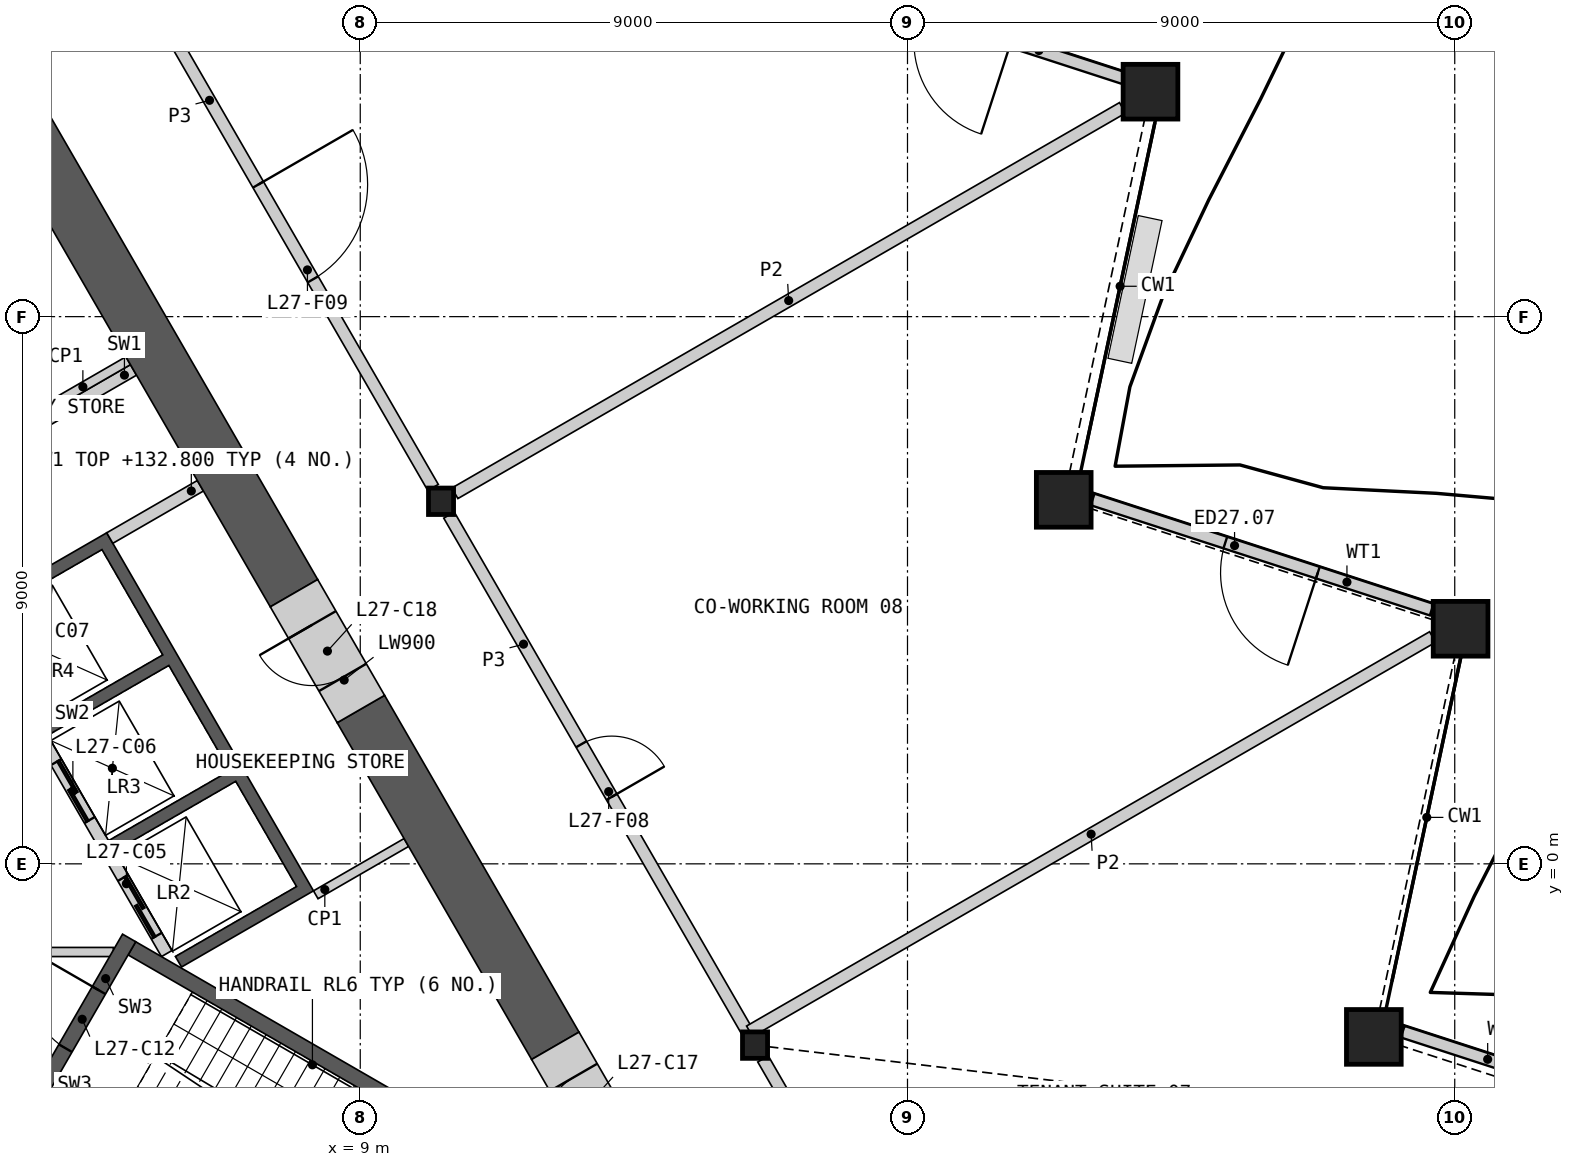
"""IFC4 building model, lengths in metres.
Left out: names, types, materials, properties, quantities, classifications, styles, units other than length and angle.
Written with IfcOpenShell. Run it as: python <this file> out.ifc"""

import sys

from ifc_helpers import new_model, si_unit, direction, frame, frame_2d, origin, origin_2d, place, context, subcontext, project, spatial, polyline, rectangle, hollow_rectangle, i_section, outline, extrude, element, fill, save


model = new_model("IFC4")
c1 = context("Model", 3, precision=1e-05, world=origin(), true_north=direction((0.0, 1.0)))
c2 = subcontext(c1, "Body", "Model", "MODEL_VIEW")
j1 = project(units=[si_unit("LENGTHUNIT", "METRE"), si_unit("PLANEANGLEUNIT", "RADIAN")], contexts=[c1])
p1 = place(None, origin())
s1 = spatial("IfcSite", under=j1, at=p1, CompositionType="ELEMENT")
p2 = place(p1, origin())
s2 = spatial("IfcBuilding", under=s1, at=p2, CompositionType="ELEMENT")
p3 = place(p2, frame((0.0, 0.0, 129.0)))
s3 = spatial("IfcBuildingStorey", under=s2, at=p3, CompositionType="ELEMENT", Elevation=129.0)
for number, where, z_axis, x_axis in (
    (1, (25.669, -2.846, 0.0), (0.0, 0.0, 1.0), (1.0, 0.0, 0.0)),
    (2, (27.096, 3.866, 0.0), (0.0, 0.0, 1.0), (1.0, 0.0, 0.0)),
    (3, (20.57, 5.987, 0.0), (0.0, 0.0, 1.0), (1.0, 0.0, 0.0)),
    (4, (21.996, 12.699, 0.0), (0.0, 0.0, 1.0), (1.0, 0.0, 0.0)),
):
    element("IfcColumn", number, at=place(p3, frame(where, z_axis=z_axis, x_axis=x_axis)), inside=s3, PredefinedType="COLUMN", context=c2, shape_type="SweptSolid", body=[
        extrude(hollow_rectangle(XDim=0.9, YDim=0.9, WallThickness=0.06, at=origin_2d()), origin(), (0.0, 0.0, 1.0), 4.2),
    ])
for number, where, z_axis, x_axis in (
    (5, (15.493, -2.982, 0.0), (0.0, 0.0, 1.0), (1.0, 0.0, 0.0)),
    (6, (10.328, 5.963, 0.0), (0.0, 0.0, 1.0), (1.0, 0.0, 0.0)),
):
    element("IfcColumn", number, at=place(p3, frame(where, z_axis=z_axis, x_axis=x_axis)), inside=s3, PredefinedType="COLUMN", context=c2, shape_type="SweptSolid", body=[
        extrude(i_section(OverallWidth=0.412, OverallDepth=0.435, WebThickness=0.036, FlangeThickness=0.057, at=origin_2d()), origin(), (0.0, 0.0, 1.0), 4.2),
    ])
p4 = place(p3, frame((31.734, -4.577, 0.0), z_axis=(0.0, 0.0, 1.0), x_axis=(-0.951060927669, 0.309003417231, 0.0)))
e7 = element("IfcWall", 7, at=p4, inside=s3, PredefinedType="SOLIDWALL", context=c2, shape_type="SweptSolid", body=[
    extrude(rectangle(XDim=5.877, YDim=0.2, at=frame_2d((2.939, 0.0))), origin(), (0.0, 0.0, 1.0), 3.189),
])
p5 = place(p4, frame((2.042, 0.0, 0.0)))
e8 = element("IfcOpeningElement", 8, at=p5, cuts=e7, PredefinedType="OPENING", context=c2, shape_type="SweptSolid", body=[
    extrude(rectangle(XDim=1.6, YDim=2.4, at=frame_2d((0.8, 1.2))), frame((0.0, 0.11, 0.0), z_axis=(0.0, -1.0, 0.0), x_axis=(1.0, 0.0, 0.0)), (0.0, 0.0, 1.0), 0.22),
])
p6 = place(p3, frame((26.622, 4.181, 0.0), z_axis=(0.0, 0.0, 1.0), x_axis=(-0.951053952554, 0.309024884649, 0.0)))
e9 = element("IfcWall", 9, at=p6, inside=s3, PredefinedType="SOLIDWALL", context=c2, shape_type="SweptSolid", body=[
    extrude(rectangle(XDim=5.865, YDim=0.2, at=frame_2d((2.932, 0.0))), origin(), (0.0, 0.0, 1.0), 3.189),
])
p7 = place(p6, frame((1.969, 0.0, 0.0)))
e10 = element("IfcOpeningElement", 10, at=p7, cuts=e9, PredefinedType="OPENING", context=c2, shape_type="SweptSolid", body=[
    extrude(rectangle(XDim=1.6, YDim=2.4, at=frame_2d((0.8, 1.2))), frame((0.0, 0.11, 0.0), z_axis=(0.0, -1.0, 0.0), x_axis=(1.0, 0.0, 0.0)), (0.0, 0.0, 1.0), 0.22),
])
p8 = place(p3, frame((21.567, 12.92, 0.0), z_axis=(0.0, 0.0, 1.0), x_axis=(-0.951051366173, 0.309032844373, 0.0)))
e11 = element("IfcWall", 11, at=p8, inside=s3, PredefinedType="SOLIDWALL", context=c2, shape_type="SweptSolid", body=[
    extrude(rectangle(XDim=5.912, YDim=0.2, at=frame_2d((2.956, 0.0))), origin(), (0.0, 0.0, 1.0), 3.189),
])
p9 = place(p8, frame((1.957, 0.0, 0.0)))
e12 = element("IfcOpeningElement", 12, at=p9, cuts=e11, PredefinedType="OPENING", context=c2, shape_type="SweptSolid", body=[
    extrude(rectangle(XDim=1.6, YDim=2.4, at=frame_2d((0.8, 1.2))), frame((0.0, 0.11, 0.0), z_axis=(0.0, -1.0, 0.0), x_axis=(1.0, 0.0, 0.0)), (0.0, 0.0, 1.0), 0.22),
])
p10 = place(p3, origin())
e13 = element("IfcWall", 13, at=p10, inside=s3, PredefinedType="SHEAR", context=c2, shape_type="SweptSolid", body=[
    extrude(outline(polyline([(2.66, 4.192), (4.831, 5.445), (8.231, -0.444), (6.061, -1.697), (5.96, -1.524), (7.952, -0.374), (6.952, 1.358), (4.96, 0.208), (4.861, 0.381), (6.852, 1.531), (5.852, 3.263), (3.861, 2.113), (3.76, 2.287), (5.752, 3.437), (4.752, 5.169), (2.76, 4.019), (2.66, 4.192)])), origin(), (0.0, 0.0, 1.0), 3.8),
])
p11 = place(p3, frame((5.817, -1.476, 0.0), z_axis=(0.0, 0.0, 1.0), x_axis=(-0.500002616675, 0.866023893041, 0.0)))
e14 = element("IfcWall", 14, at=p11, inside=s3, PredefinedType="SOLIDWALL", context=c2, shape_type="SweptSolid", body=[
    extrude(rectangle(XDim=8.373, YDim=0.2, at=frame_2d((4.187, 0.0))), origin(), (0.0, 0.0, 1.0), 3.8),
])
p12 = place(p11, frame((0.337, 0.0, 0.0)))
e15 = element("IfcOpeningElement", 15, at=p12, cuts=e14, PredefinedType="OPENING", context=c2, shape_type="SweptSolid", body=[
    extrude(rectangle(XDim=1.1, YDim=2.1, at=frame_2d((0.55, 1.05))), frame((0.0, 0.11, 0.0), z_axis=(0.0, -1.0, 0.0), x_axis=(1.0, 0.0, 0.0)), (0.0, 0.0, 1.0), 0.22),
])
p13 = place(p11, frame((2.537, 0.0, 0.0)))
e16 = element("IfcOpeningElement", 16, at=p13, cuts=e14, PredefinedType="OPENING", context=c2, shape_type="SweptSolid", body=[
    extrude(rectangle(XDim=1.1, YDim=2.1, at=frame_2d((0.55, 1.05))), frame((0.0, 0.11, 0.0), z_axis=(0.0, -1.0, 0.0), x_axis=(1.0, 0.0, 0.0)), (0.0, 0.0, 1.0), 0.22),
])
p14 = place(p11, frame((4.737, 0.0, 0.0)))
e17 = element("IfcOpeningElement", 17, at=p14, cuts=e14, PredefinedType="OPENING", context=c2, shape_type="SweptSolid", body=[
    extrude(rectangle(XDim=1.1, YDim=2.1, at=frame_2d((0.55, 1.05))), frame((0.0, 0.11, 0.0), z_axis=(0.0, -1.0, 0.0), x_axis=(1.0, 0.0, 0.0)), (0.0, 0.0, 1.0), 0.22),
])
p15 = place(p11, frame((7.037, 0.0, 0.0)))
e18 = element("IfcOpeningElement", 18, at=p15, cuts=e14, PredefinedType="OPENING", context=c2, shape_type="SweptSolid", body=[
    extrude(rectangle(XDim=0.9, YDim=2.1, at=frame_2d((0.45, 1.05))), frame((0.0, 0.11, 0.0), z_axis=(0.0, -1.0, 0.0), x_axis=(1.0, 0.0, 0.0)), (0.0, 0.0, 1.0), 0.22),
])
for number, where, z_axis, x_axis in (
    (19, (4.881, 5.358, 0.0), (0.0, 0.0, 1.0), (0.866, 0.5, 0.0)),
    (20, (3.781, 7.263, 0.0), (0.0, 0.0, 1.0), (0.866, 0.5, 0.0)),
):
    element("IfcWall", number, at=place(p3, frame(where, z_axis=z_axis, x_axis=x_axis)), inside=s3, PredefinedType="SHEAR", context=c2, shape_type="SweptSolid", body=[
        extrude(rectangle(XDim=1.72, YDim=0.2, at=frame_2d((0.86, 0.0))), origin(), (0.0, 0.0, 1.0), 3.8),
    ])
p16 = place(p3, frame((-4.941, -1.45, 0.0), z_axis=(0.0, 0.0, 1.0), x_axis=(1.0, 0.0, 0.0)))
e21 = element("IfcWall", 21, at=p16, inside=s3, PredefinedType="PARTITIONING", context=c2, shape_type="SweptSolid", body=[
    extrude(rectangle(XDim=9.882, YDim=0.15, at=frame_2d((4.941, 0.0))), origin(), (0.0, 0.0, 1.0), 3.8),
])
p17 = place(p16, frame((4.391, 0.0, 0.0)))
e22 = element("IfcOpeningElement", 22, at=p17, cuts=e21, PredefinedType="OPENING", context=c2, shape_type="SweptSolid", body=[
    extrude(rectangle(XDim=1.1, YDim=2.1, at=frame_2d((0.55, 1.05))), frame((0.0, 0.085, 0.0), z_axis=(0.0, -1.0, 0.0), x_axis=(1.0, 0.0, 0.0)), (0.0, 0.0, 1.0), 0.17),
])
p18 = place(p3, origin())
e23 = element("IfcWall", 23, at=p18, inside=s3, PredefinedType="SHEAR", context=c2, shape_type="SweptSolid", body=[
    extrude(outline(polyline([(10.032, -4.298), (10.374, -4.206), (5.307, -1.281), (5.182, -1.498), (10.032, -4.298)])), origin(), (0.0, 0.0, 1.0), 3.8),
])
p19 = place(p3, frame((3.655, -3.893, 0.0), z_axis=(0.0, 0.0, 1.0), x_axis=(0.499982516597, 0.866035497597, 0.0)))
e24 = element("IfcWall", 24, at=p19, inside=s3, PredefinedType="SHEAR", context=c2, shape_type="SweptSolid", body=[
    extrude(rectangle(XDim=3.088, YDim=0.25, at=frame_2d((1.544, 0.0))), origin(), (0.0, 0.0, 1.0), 3.8),
])
p20 = place(p19, frame((0.994, 0.0, 0.0)))
e25 = element("IfcOpeningElement", 25, at=p20, cuts=e24, PredefinedType="OPENING", context=c2, shape_type="SweptSolid", body=[
    extrude(rectangle(XDim=1.1, YDim=2.1, at=frame_2d((0.55, 1.05))), frame((0.0, 0.135, 0.0), z_axis=(0.0, -1.0, 0.0), x_axis=(1.0, 0.0, 0.0)), (0.0, 0.0, 1.0), 0.27),
])
for number, where, z_axis, x_axis in (
    (26, (3.693, 7.415, 0.0), (0.0, 0.0, 1.0), (0.866, 0.5, 0.0)),
    (27, (8.268, -0.509, 0.0), (0.0, 0.0, 1.0), (0.866, 0.5, 0.0)),
):
    element("IfcWall", number, at=place(p3, frame(where, z_axis=z_axis, x_axis=x_axis)), inside=s3, PredefinedType="PARTITIONING", context=c2, shape_type="SweptSolid", body=[
        extrude(rectangle(XDim=1.72, YDim=0.15, at=frame_2d((0.86, 0.0))), origin(), (0.0, 0.0, 1.0), 3.8),
    ])
p21 = place(p3, frame((7.91, 4.451, 0.0), z_axis=(0.0, 0.0, 1.0), x_axis=(-0.500001962043, 0.866024270995, 0.0)))
e28 = element("IfcWall", 28, at=p21, inside=s3, PredefinedType="SHEAR", context=c2, shape_type="SweptSolid", body=[
    extrude(rectangle(XDim=8.796, YDim=0.9, at=frame_2d((4.398, 0.0))), origin(), (0.0, 0.0, 1.0), 3.8),
])
p22 = place(p3, frame((12.208, -2.992, 0.0), z_axis=(0.0, 0.0, 1.0), x_axis=(-0.499990106751, 0.866031115579, 0.0)))
e29 = element("IfcWall", 29, at=p22, inside=s3, PredefinedType="SHEAR", context=c2, shape_type="SweptSolid", body=[
    extrude(rectangle(XDim=6.396, YDim=0.9, at=frame_2d((3.198, 0.0))), origin(), (0.0, 0.0, 1.0), 3.8),
])
p23 = place(p3, frame((13.308, -4.898, 0.0), z_axis=(0.0, 0.0, 1.0), x_axis=(-0.50002983664, 0.866008176907, 0.0)))
e30 = element("IfcWall", 30, at=p23, inside=s3, PredefinedType="SHEAR", context=c2, shape_type="SweptSolid", body=[
    extrude(rectangle(XDim=2.2, YDim=0.9, at=frame_2d((1.1, 0.0))), origin(), (0.0, 0.0, 1.0), 3.8),
])
p24 = place(p23, frame((0.6, 0.0, 0.0)))
e31 = element("IfcOpeningElement", 31, at=p24, cuts=e30, PredefinedType="OPENING", context=c2, shape_type="SweptSolid", body=[
    extrude(rectangle(XDim=1.0, YDim=2.1, at=frame_2d((0.5, 1.05))), frame((0.0, 0.46, 0.0), z_axis=(0.0, -1.0, 0.0), x_axis=(1.0, 0.0, 0.0)), (0.0, 0.0, 1.0), 0.92),
])
p25 = place(p3, frame((9.01, 2.546, 0.0), z_axis=(0.0, 0.0, 1.0), x_axis=(-0.499994660107, 0.866028486751, 0.0)))
e32 = element("IfcWall", 32, at=p25, inside=s3, PredefinedType="SHEAR", context=c2, shape_type="SweptSolid", body=[
    extrude(rectangle(XDim=2.2, YDim=0.9, at=frame_2d((1.1, 0.0))), origin(), (0.0, 0.0, 1.0), 3.8),
])
p26 = place(p25, frame((0.6, 0.0, 0.0)))
e33 = element("IfcOpeningElement", 33, at=p26, cuts=e32, PredefinedType="OPENING", context=c2, shape_type="SweptSolid", body=[
    extrude(rectangle(XDim=1.0, YDim=2.1, at=frame_2d((0.5, 1.05))), frame((0.0, 0.46, 0.0), z_axis=(0.0, -1.0, 0.0), x_axis=(1.0, 0.0, 0.0)), (0.0, 0.0, 1.0), 0.92),
])
p27 = place(p3, frame((10.46, 5.736, 0.0), z_axis=(0.0, 0.0, 1.0), x_axis=(0.500004141693, -0.866023012564, 0.0)))
e34 = element("IfcWall", 34, at=p27, inside=s3, PredefinedType="PARTITIONING", context=c2, shape_type="SweptSolid", body=[
    extrude(rectangle(XDim=9.803, YDim=0.2, at=frame_2d((4.902, 0.0))), origin(), (0.0, 0.0, 1.0), 3.8),
])
p28 = place(p27, frame((4.352, 0.0, 0.0)))
e35 = element("IfcOpeningElement", 35, at=p28, cuts=e34, PredefinedType="OPENING", context=c2, shape_type="SweptSolid", body=[
    extrude(rectangle(XDim=1.0, YDim=2.1, at=frame_2d((0.5, 1.05))), frame((0.0, 0.11, 0.0), z_axis=(0.0, -1.0, 0.0), x_axis=(1.0, 0.0, 0.0)), (0.0, 0.0, 1.0), 0.22),
])
p29 = place(p3, frame((5.295, 14.68, 0.0), z_axis=(0.0, 0.0, 1.0), x_axis=(0.500012035596, -0.866018454918, 0.0)))
e36 = element("IfcWall", 36, at=p29, inside=s3, PredefinedType="PARTITIONING", context=c2, shape_type="SweptSolid", body=[
    extrude(rectangle(XDim=9.803, YDim=0.2, at=frame_2d((4.902, 0.0))), origin(), (0.0, 0.0, 1.0), 3.8),
])
p30 = place(p29, frame((4.052, 0.0, 0.0)))
e37 = element("IfcOpeningElement", 37, at=p30, cuts=e36, PredefinedType="OPENING", context=c2, shape_type="SweptSolid", body=[
    extrude(rectangle(XDim=1.8, YDim=2.1, at=frame_2d((0.9, 1.05))), frame((0.0, 0.11, 0.0), z_axis=(0.0, -1.0, 0.0), x_axis=(1.0, 0.0, 0.0)), (0.0, 0.0, 1.0), 0.22),
])
p31 = place(p3, frame((15.624, -3.209, 0.0), z_axis=(0.0, 0.0, 1.0), x_axis=(0.499997920671, -0.866026604282, 0.0)))
e38 = element("IfcWall", 38, at=p31, inside=s3, PredefinedType="PARTITIONING", context=c2, shape_type="SweptSolid", body=[
    extrude(rectangle(XDim=6.24, YDim=0.2, at=frame_2d((3.12, 0.0))), origin(), (0.0, 0.0, 1.0), 3.8),
])
p32 = place(p31, frame((2.57, 0.0, 0.0)))
e39 = element("IfcOpeningElement", 39, at=p32, cuts=e38, PredefinedType="OPENING", context=c2, shape_type="SweptSolid", body=[
    extrude(rectangle(XDim=1.0, YDim=2.1, at=frame_2d((0.5, 1.05))), frame((0.0, 0.11, 0.0), z_axis=(0.0, -1.0, 0.0), x_axis=(1.0, 0.0, 0.0)), (0.0, 0.0, 1.0), 0.22),
])
p33 = place(p3, frame((15.403, -2.754, 0.0), z_axis=(0.0, 0.0, 1.0), x_axis=(0.866024473704, 0.500001610943, 0.0)))
e40 = element("IfcWall", 40, at=p33, inside=s3, PredefinedType="PARTITIONING", context=c2, shape_type="SweptSolid", body=[
    extrude(rectangle(XDim=12.971, YDim=0.2, at=frame_2d((6.485, 0.0))), origin(), (0.0, 0.0, 1.0), 2.885),
])
p34 = place(p3, frame((10.556, 6.094, 0.0), z_axis=(0.0, 0.0, 1.0), x_axis=(0.86602461759, 0.500001361726, 0.0)))
e41 = element("IfcWall", 41, at=p34, inside=s3, PredefinedType="PARTITIONING", context=c2, shape_type="SweptSolid", body=[
    extrude(rectangle(XDim=12.679, YDim=0.2, at=frame_2d((6.34, 0.0))), origin(), (0.0, 0.0, 1.0), 2.885),
])
p35 = place(p7, origin())
e42 = element("IfcDoor", 42, at=p35, inside=s3, OperationType="DOUBLE_DOOR_SINGLE_SWING", PredefinedType="DOOR", context=c2, shape_type="SweptSolid", body=[
    extrude(rectangle(XDim=1.6, YDim=2.4, at=frame_2d((0.8, 1.2))), frame((0.0, 0.025, 0.0), z_axis=(0.0, -1.0, 0.0), x_axis=(1.0, 0.0, 0.0)), (0.0, 0.0, 1.0), 0.05),
])
fill(e10, e42)
p36 = place(p12, origin())
e43 = element("IfcDoor", 43, at=p36, inside=s3, OperationType="SLIDING_TO_LEFT", PredefinedType="DOOR", context=c2, shape_type="SweptSolid", body=[
    extrude(rectangle(XDim=1.1, YDim=2.1, at=frame_2d((0.55, 1.05))), frame((0.0, 0.025, 0.0), z_axis=(0.0, -1.0, 0.0), x_axis=(1.0, 0.0, 0.0)), (0.0, 0.0, 1.0), 0.05),
])
fill(e15, e43)
p37 = place(p13, origin())
e44 = element("IfcDoor", 44, at=p37, inside=s3, OperationType="SLIDING_TO_LEFT", PredefinedType="DOOR", context=c2, shape_type="SweptSolid", body=[
    extrude(rectangle(XDim=1.1, YDim=2.1, at=frame_2d((0.55, 1.05))), frame((0.0, 0.025, 0.0), z_axis=(0.0, -1.0, 0.0), x_axis=(1.0, 0.0, 0.0)), (0.0, 0.0, 1.0), 0.05),
])
fill(e16, e44)
p38 = place(p20, origin())
e45 = element("IfcDoor", 45, at=p38, inside=s3, OperationType="SINGLE_SWING_RIGHT", PredefinedType="DOOR", context=c2, shape_type="SweptSolid", body=[
    extrude(rectangle(XDim=1.1, YDim=2.1, at=frame_2d((0.55, 1.05))), frame((0.0, 0.025, 0.0), z_axis=(0.0, -1.0, 0.0), x_axis=(1.0, 0.0, 0.0)), (0.0, 0.0, 1.0), 0.05),
])
fill(e25, e45)
p39 = place(p24, origin())
e46 = element("IfcDoor", 46, at=p39, inside=s3, OperationType="SINGLE_SWING_LEFT", PredefinedType="DOOR", context=c2, shape_type="SweptSolid", body=[
    extrude(rectangle(XDim=1.0, YDim=2.1, at=frame_2d((0.5, 1.05))), frame((0.0, 0.205, 0.0), z_axis=(0.0, -1.0, 0.0), x_axis=(1.0, 0.0, 0.0)), (0.0, 0.0, 1.0), 0.05),
])
fill(e31, e46)
p40 = place(p26, origin())
e47 = element("IfcDoor", 47, at=p40, inside=s3, OperationType="SINGLE_SWING_RIGHT", PredefinedType="DOOR", context=c2, shape_type="SweptSolid", body=[
    extrude(rectangle(XDim=1.0, YDim=2.1, at=frame_2d((0.5, 1.05))), frame((0.0, 0.205, 0.0), z_axis=(0.0, -1.0, 0.0), x_axis=(1.0, 0.0, 0.0)), (0.0, 0.0, 1.0), 0.05),
])
fill(e33, e47)
p41 = place(p28, origin())
e48 = element("IfcDoor", 48, at=p41, inside=s3, OperationType="SINGLE_SWING_RIGHT", PredefinedType="DOOR", context=c2, shape_type="SweptSolid", body=[
    extrude(rectangle(XDim=1.0, YDim=2.1, at=frame_2d((0.5, 1.05))), frame((0.0, 0.025, 0.0), z_axis=(0.0, -1.0, 0.0), x_axis=(1.0, 0.0, 0.0)), (0.0, 0.0, 1.0), 0.05),
])
fill(e35, e48)
p42 = place(p30, origin())
e49 = element("IfcDoor", 49, at=p42, inside=s3, OperationType="DOUBLE_DOOR_SINGLE_SWING", PredefinedType="DOOR", context=c2, shape_type="SweptSolid", body=[
    extrude(rectangle(XDim=1.8, YDim=2.1, at=frame_2d((0.9, 1.05))), frame((0.0, 0.025, 0.0), z_axis=(0.0, -1.0, 0.0), x_axis=(1.0, 0.0, 0.0)), (0.0, 0.0, 1.0), 0.05),
])
fill(e37, e49)
save(model, sys.argv[1])
